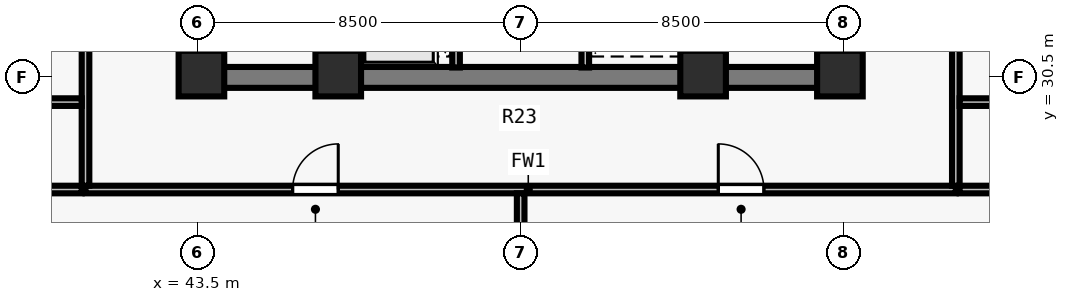
"""IFC4 building model, lengths in metres.
Left out: names, types, materials, properties, quantities, classifications, styles, units other than length and angle.
Written with IfcOpenShell. Run it as: python <this file> out.ifc"""

import sys

from ifc_helpers import new_model, si_unit, direction, frame, frame_2d, origin, origin_2d, place, context, subcontext, project, spatial, rectangle, extrude, element, fill, save


model = new_model("IFC4")
c1 = context("Model", 3, precision=1e-05, world=origin(), true_north=direction((0.0, 1.0)))
c2 = subcontext(c1, "Body", "Model", "MODEL_VIEW")
j1 = project(units=[si_unit("LENGTHUNIT", "METRE"), si_unit("PLANEANGLEUNIT", "RADIAN")], contexts=[c1])
p1 = place(None, origin())
s1 = spatial("IfcSite", under=j1, at=p1, CompositionType="ELEMENT")
p2 = place(p1, origin())
s2 = spatial("IfcBuilding", under=s1, at=p2, CompositionType="ELEMENT")
p3 = place(p2, frame((0.0, 0.0, 97.0)))
s3 = spatial("IfcBuildingStorey", under=s2, at=p3, CompositionType="ELEMENT", Elevation=97.0)
for number, where, z_axis, x_axis in (
    (1, (43.6, 30.6, 0.0), (0.0, 0.0, 1.0), (1.0, 0.0, 0.0)),
    (2, (47.2, 30.6, 0.0), (0.0, 0.0, 1.0), (1.0, 0.0, 0.0)),
    (3, (56.8, 30.6, 0.0), (0.0, 0.0, 1.0), (1.0, 0.0, 0.0)),
    (4, (60.4, 30.6, 0.0), (0.0, 0.0, 1.0), (1.0, 0.0, 0.0)),
):
    element("IfcColumn", number, at=place(p3, frame(where, z_axis=z_axis, x_axis=x_axis)), inside=s3, PredefinedType="COLUMN", context=c2, shape_type="SweptSolid", body=[
        extrude(rectangle(XDim=1.2, YDim=1.2, at=origin_2d()), origin(), (0.0, 0.0, 1.0), 4.5),
    ])
p4 = place(p3, frame((43.225, 30.5, 0.0), z_axis=(0.0, 0.0, 1.0), x_axis=(1.0, 0.0, 0.0)))
e5 = element("IfcWall", 5, at=p4, inside=s3, PredefinedType="SHEAR", context=c2, shape_type="SweptSolid", body=[
    extrude(rectangle(XDim=17.55, YDim=0.55, at=frame_2d((8.775, 0.0))), origin(), (0.0, 0.0, 1.0), 4.28),
])
for number, where, z_axis, x_axis in (
    (6, (43.5, 30.765, 0.0), (0.0, 0.0, 1.0), (0.0, 1.0, 0.0)),
    (7, (60.5, 30.765, 0.0), (0.0, 0.0, 1.0), (0.0, 1.0, 0.0)),
):
    element("IfcWall", number, at=place(p3, frame(where, z_axis=z_axis, x_axis=x_axis)), inside=s3, PredefinedType="SHEAR", context=c2, shape_type="SweptSolid", body=[
        extrude(rectangle(XDim=7.985, YDim=0.55, at=frame_2d((3.993, 0.0))), origin(), (0.0, 0.0, 1.0), 4.28),
    ])
p5 = place(p3, frame((50.3, 30.76, 0.0), z_axis=(0.0, 0.0, 1.0), x_axis=(0.0, 1.0, 0.0)))
e8 = element("IfcWall", 8, at=p5, inside=s3, PredefinedType="SOLIDWALL", context=c2, shape_type="SweptSolid", body=[
    extrude(rectangle(XDim=7.855, YDim=0.2, at=frame_2d((3.927, 0.0))), origin(), (0.0, 0.0, 1.0), 4.28),
])
p6 = place(p5, frame((0.79, 0.0, 0.0)))
e9 = element("IfcOpeningElement", 9, at=p6, cuts=e8, PredefinedType="OPENING", context=c2, shape_type="SweptSolid", body=[
    extrude(rectangle(XDim=1.1, YDim=2.2, at=frame_2d((0.55, 1.1))), frame((0.0, 0.11, 0.0), z_axis=(0.0, -1.0, 0.0), x_axis=(1.0, 0.0, 0.0)), (0.0, 0.0, 1.0), 0.22),
])
p7 = place(p5, frame((3.49, 0.0, 0.0)))
e10 = element("IfcOpeningElement", 10, at=p7, cuts=e8, PredefinedType="OPENING", context=c2, shape_type="SweptSolid", body=[
    extrude(rectangle(XDim=1.1, YDim=2.2, at=frame_2d((0.55, 1.1))), frame((0.0, 0.11, 0.0), z_axis=(0.0, -1.0, 0.0), x_axis=(1.0, 0.0, 0.0)), (0.0, 0.0, 1.0), 0.22),
])
p8 = place(p5, frame((6.19, 0.0, 0.0)))
e11 = element("IfcOpeningElement", 11, at=p8, cuts=e8, PredefinedType="OPENING", context=c2, shape_type="SweptSolid", body=[
    extrude(rectangle(XDim=1.1, YDim=2.2, at=frame_2d((0.55, 1.1))), frame((0.0, 0.11, 0.0), z_axis=(0.0, -1.0, 0.0), x_axis=(1.0, 0.0, 0.0)), (0.0, 0.0, 1.0), 0.22),
])
p9 = place(p3, frame((53.7, 30.76, 0.0), z_axis=(0.0, 0.0, 1.0), x_axis=(0.0, 1.0, 0.0)))
e12 = element("IfcWall", 12, at=p9, inside=s3, PredefinedType="SOLIDWALL", context=c2, shape_type="SweptSolid", body=[
    extrude(rectangle(XDim=7.855, YDim=0.2, at=frame_2d((3.927, 0.0))), origin(), (0.0, 0.0, 1.0), 4.28),
])
for number, where, z_axis, x_axis in (
    (13, (47.35, 30.76, 0.0), (0.0, 0.0, 1.0), (0.0, 1.0, 0.0)),
    (14, (56.65, 30.76, 0.0), (0.0, 0.0, 1.0), (0.0, 1.0, 0.0)),
):
    element("IfcWall", number, at=place(p3, frame(where, z_axis=z_axis, x_axis=x_axis)), inside=s3, PredefinedType="SOLIDWALL", context=c2, shape_type="SweptSolid", body=[
        extrude(rectangle(XDim=7.855, YDim=0.18, at=frame_2d((3.927, 0.0))), origin(), (0.0, 0.0, 1.0), 4.28),
    ])
p10 = place(p3, frame((40.55, 27.55, 0.0), z_axis=(0.0, 0.0, 1.0), x_axis=(1.0, 0.0, 0.0)))
e15 = element("IfcWall", 15, at=p10, inside=s3, PredefinedType="SOLIDWALL", context=c2, shape_type="SweptSolid", body=[
    extrude(rectangle(XDim=22.9, YDim=0.2, at=frame_2d((11.45, 0.0))), origin(), (0.0, 0.0, 1.0), 4.28),
])
p11 = place(p10, frame((5.45, 0.0, 0.0)))
e16 = element("IfcOpeningElement", 16, at=p11, cuts=e15, PredefinedType="OPENING", context=c2, shape_type="SweptSolid", body=[
    extrude(rectangle(XDim=1.2, YDim=2.15, at=frame_2d((0.6, 1.075))), frame((0.0, 0.11, 0.0), z_axis=(0.0, -1.0, 0.0), x_axis=(1.0, 0.0, 0.0)), (0.0, 0.0, 1.0), 0.22),
])
p12 = place(p10, frame((16.65, 0.0, 0.0)))
e17 = element("IfcOpeningElement", 17, at=p12, cuts=e15, PredefinedType="OPENING", context=c2, shape_type="SweptSolid", body=[
    extrude(rectangle(XDim=1.2, YDim=2.15, at=frame_2d((0.6, 1.075))), frame((0.0, 0.11, 0.0), z_axis=(0.0, -1.0, 0.0), x_axis=(1.0, 0.0, 0.0)), (0.0, 0.0, 1.0), 0.22),
])
p13 = place(p3, frame((40.55, 27.65, 0.0), z_axis=(0.0, 0.0, 1.0), x_axis=(0.0, 1.0, 0.0)))
e18 = element("IfcWall", 18, at=p13, inside=s3, PredefinedType="SOLIDWALL", context=c2, shape_type="SweptSolid", body=[
    extrude(rectangle(XDim=22.7, YDim=0.2, at=frame_2d((11.35, 0.0))), origin(), (0.0, 0.0, 1.0), 4.28),
])
p14 = place(p13, frame((9.2, 0.0, 0.0)))
e19 = element("IfcOpeningElement", 19, at=p14, cuts=e18, PredefinedType="OPENING", context=c2, shape_type="SweptSolid", body=[
    extrude(rectangle(XDim=1.6, YDim=2.2, at=frame_2d((0.8, 1.1))), frame((0.0, 0.11, 0.0), z_axis=(0.0, -1.0, 0.0), x_axis=(1.0, 0.0, 0.0)), (0.0, 0.0, 1.0), 0.22),
])
p15 = place(p3, frame((63.45, 27.65, 0.0), z_axis=(0.0, 0.0, 1.0), x_axis=(0.0, 1.0, 0.0)))
e20 = element("IfcWall", 20, at=p15, inside=s3, PredefinedType="SOLIDWALL", context=c2, shape_type="SweptSolid", body=[
    extrude(rectangle(XDim=22.7, YDim=0.2, at=frame_2d((11.35, 0.0))), origin(), (0.0, 0.0, 1.0), 4.28),
])
p16 = place(p15, frame((9.2, 0.0, 0.0)))
e21 = element("IfcOpeningElement", 21, at=p16, cuts=e20, PredefinedType="OPENING", context=c2, shape_type="SweptSolid", body=[
    extrude(rectangle(XDim=1.6, YDim=2.2, at=frame_2d((0.8, 1.1))), frame((0.0, 0.11, 0.0), z_axis=(0.0, -1.0, 0.0), x_axis=(1.0, 0.0, 0.0)), (0.0, 0.0, 1.0), 0.22),
])
for number, where, z_axis, x_axis in (
    (22, (26.845, 29.85, 0.0), (0.0, 0.0, 1.0), (1.0, 0.0, 0.0)),
    (23, (63.55, 29.85, 0.0), (0.0, 0.0, 1.0), (1.0, 0.0, 0.0)),
):
    element("IfcWall", number, at=place(p3, frame(where, z_axis=z_axis, x_axis=x_axis)), inside=s3, PredefinedType="SOLIDWALL", context=c2, shape_type="SweptSolid", body=[
        extrude(rectangle(XDim=13.605, YDim=0.2, at=frame_2d((6.802, 0.0))), origin(), (0.0, 0.0, 1.0), 4.28),
    ])
for number, where, z_axis, x_axis in (
    (24, (52.0, 13.845, 0.0), (0.0, 0.0, 1.0), (0.0, 1.0, 0.0)),
    (25, (26.845, 27.55, 0.0), (0.0, 0.0, 1.0), (1.0, 0.0, 0.0)),
    (26, (63.55, 27.55, 0.0), (0.0, 0.0, 1.0), (1.0, 0.0, 0.0)),
):
    element("IfcWall", number, at=place(p3, frame(where, z_axis=z_axis, x_axis=x_axis)), inside=s3, PredefinedType="SOLIDWALL", context=c2, shape_type="SweptSolid", body=[
        extrude(rectangle(XDim=13.605, YDim=0.2, at=frame_2d((6.802, 0.0))), origin(), (0.0, 0.0, 1.0), 3.849),
    ])
for number, where, z_axis, x_axis in (
    (27, (47.07, 38.78, 0.0), (0.0, 0.0, 1.0), (0.0, -1.0, 0.0)),
    (28, (56.93, 38.78, 0.0), (0.0, 0.0, 1.0), (0.0, -1.0, 0.0)),
):
    element("IfcWall", number, at=place(p3, frame(where, z_axis=z_axis, x_axis=x_axis)), inside=s3, PredefinedType="SOLIDWALL", context=c2, shape_type="SweptSolid", body=[
        extrude(rectangle(XDim=8.017, YDim=0.18, at=frame_2d((4.009, 0.0))), origin(), (0.0, 0.0, 1.0), 4.28),
    ])
p17 = place(p11, origin())
e29 = element("IfcDoor", 29, at=p17, inside=s3, OperationType="SINGLE_SWING_RIGHT", PredefinedType="DOOR", context=c2, shape_type="SweptSolid", body=[
    extrude(rectangle(XDim=1.2, YDim=2.15, at=frame_2d((0.6, 1.075))), frame((0.0, 0.025, 0.0), z_axis=(0.0, -1.0, 0.0), x_axis=(1.0, 0.0, 0.0)), (0.0, 0.0, 1.0), 0.05),
])
fill(e16, e29)
p18 = place(p12, origin())
e30 = element("IfcDoor", 30, at=p18, inside=s3, OperationType="SINGLE_SWING_LEFT", PredefinedType="DOOR", context=c2, shape_type="SweptSolid", body=[
    extrude(rectangle(XDim=1.2, YDim=2.15, at=frame_2d((0.6, 1.075))), frame((0.0, 0.025, 0.0), z_axis=(0.0, -1.0, 0.0), x_axis=(1.0, 0.0, 0.0)), (0.0, 0.0, 1.0), 0.05),
])
fill(e17, e30)
save(model, sys.argv[1])
